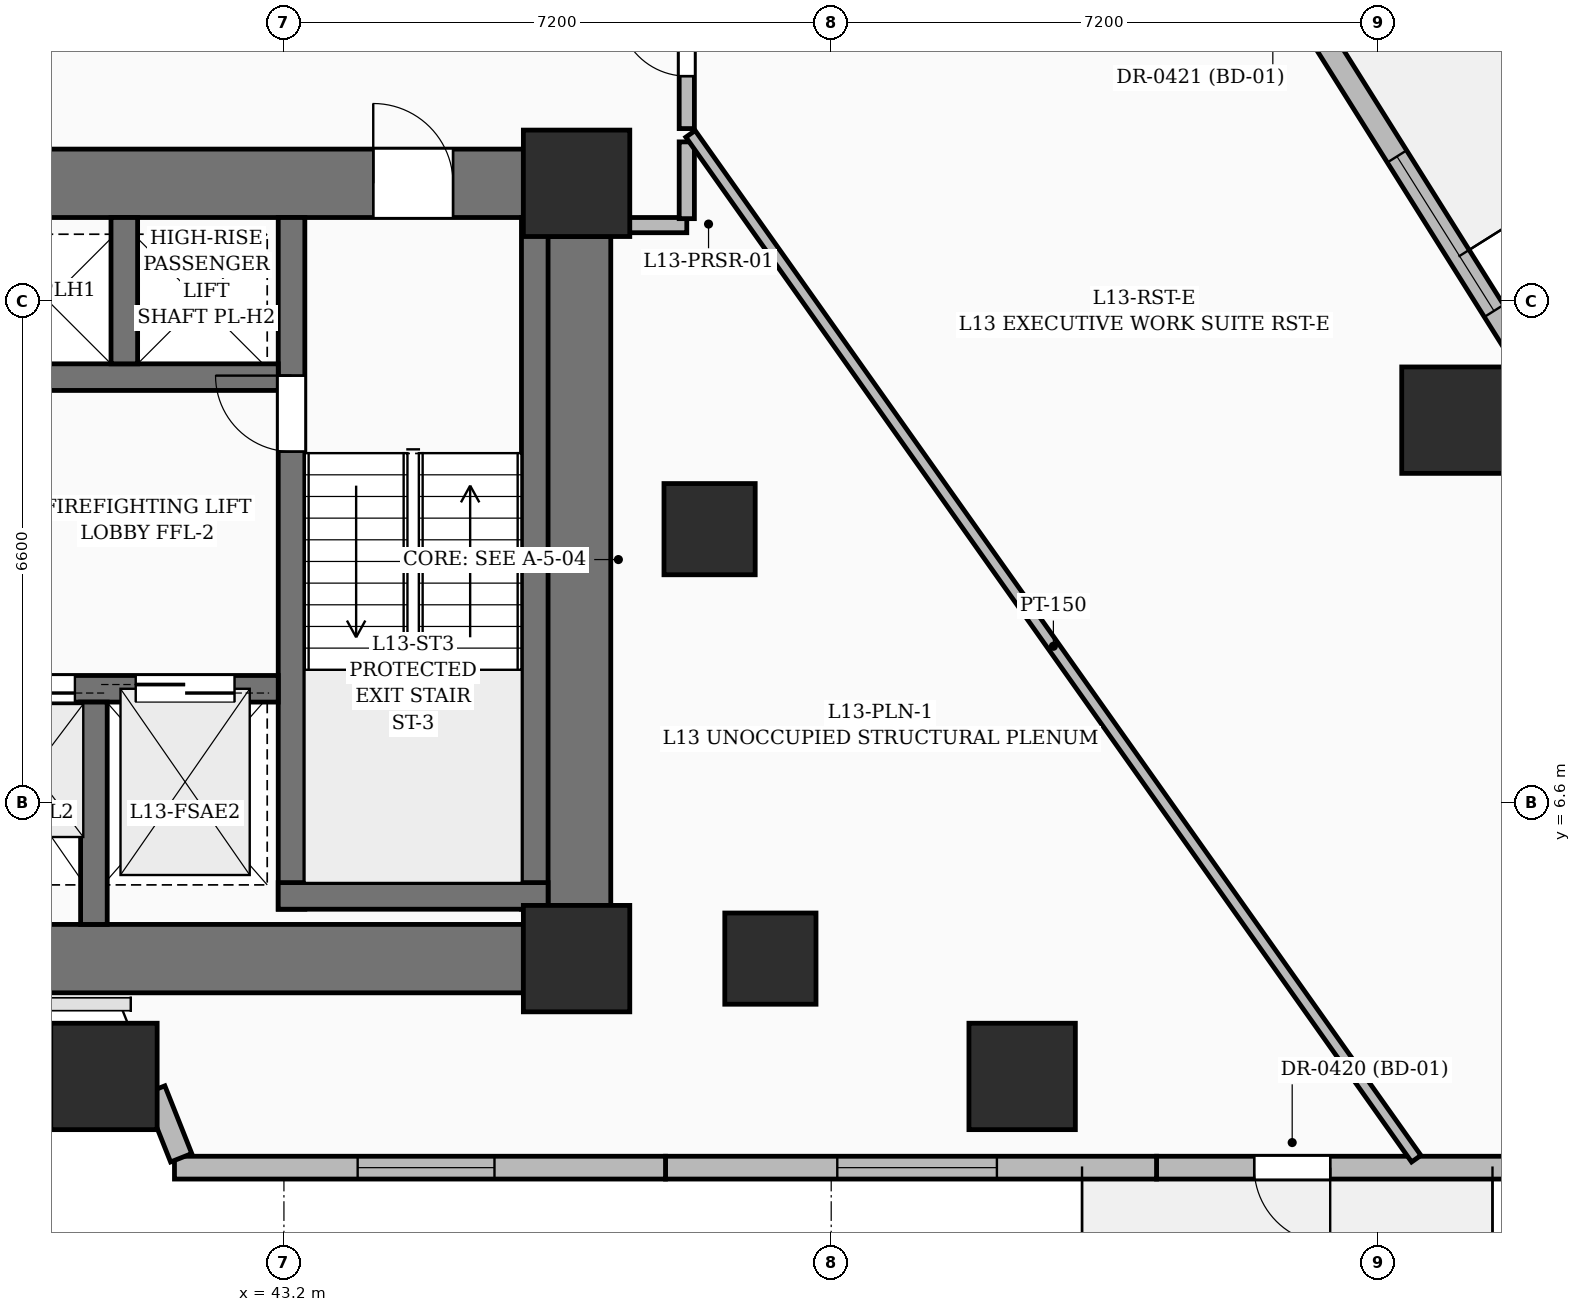
"""IFC4 building model, lengths in metres.
Left out: names, types, materials, properties, quantities, classifications, styles, units other than length and angle.
Written with IfcOpenShell. Run it as: python <this file> out.ifc"""

import sys

from ifc_helpers import new_model, si_unit, direction, frame, frame_2d, origin, origin_2d, place, context, subcontext, project, spatial, rectangle, extrude, element, fill, save


model = new_model("IFC4")
c1 = context("Model", 3, precision=1e-05, world=origin(), true_north=direction((0.0, 1.0)))
c2 = subcontext(c1, "Body", "Model", "MODEL_VIEW")
j1 = project(units=[si_unit("LENGTHUNIT", "METRE"), si_unit("PLANEANGLEUNIT", "RADIAN")], contexts=[c1])
p1 = place(None, origin())
s1 = spatial("IfcSite", under=j1, at=p1, CompositionType="ELEMENT")
p2 = place(p1, origin())
s2 = spatial("IfcBuilding", under=s1, at=p2, CompositionType="ELEMENT")
p3 = place(p2, frame((0.0, 0.0, 57.0)))
s3 = spatial("IfcBuildingStorey", under=s2, at=p3, CompositionType="ELEMENT", Elevation=57.0)
for number, where, z_axis, x_axis in (
    (1, (47.05, 4.55, 0.0), (0.0, 0.0, 1.0), (1.0, 0.0, 0.0)),
    (2, (47.05, 14.75, 0.0), (0.0, 0.0, 1.0), (1.0, 0.0, 0.0)),
):
    element("IfcColumn", number, at=place(p3, frame(where, z_axis=z_axis, x_axis=x_axis)), inside=s3, PredefinedType="COLUMN", context=c2, shape_type="SweptSolid", body=[
        extrude(rectangle(XDim=1.4, YDim=1.4, at=origin_2d()), origin(), (0.0, 0.0, 1.0), 3.6),
    ])
for number, where, z_axis, x_axis in (
    (3, (49.6, 4.55, 0.0), (0.0, 0.0, 1.0), (1.0, 0.0, 0.0)),
    (4, (48.8, 10.2, 0.0), (0.0, 0.0, 1.0), (1.0, 0.0, 0.0)),
):
    element("IfcColumn", number, at=place(p3, frame(where, z_axis=z_axis, x_axis=x_axis)), inside=s3, PredefinedType="COLUMN", context=c2, shape_type="SweptSolid", body=[
        extrude(rectangle(XDim=1.2, YDim=1.2, at=origin_2d()), origin(), (0.0, 0.0, 1.0), 3.6),
    ])
p4 = place(p3, frame((35.85, 4.55, 0.0), z_axis=(0.0, 0.0, 1.0), x_axis=(1.0, 0.0, 0.0)))
e5 = element("IfcWall", 5, at=p4, inside=s3, PredefinedType="SHEAR", context=c2, shape_type="SweptSolid", body=[
    extrude(rectangle(XDim=10.5, YDim=0.9, at=frame_2d((5.25, 0.0))), origin(), (0.0, 0.0, 1.0), 3.6),
])
p5 = place(p3, frame((35.85, 14.75, 0.0), z_axis=(0.0, 0.0, 1.0), x_axis=(1.0, 0.0, 0.0)))
e6 = element("IfcWall", 6, at=p5, inside=s3, PredefinedType="SHEAR", context=c2, shape_type="SweptSolid", body=[
    extrude(rectangle(XDim=10.5, YDim=0.9, at=frame_2d((5.25, 0.0))), origin(), (0.0, 0.0, 1.0), 3.6),
])
p6 = place(p5, frame((0.925, 0.0, 0.0)))
e7 = element("IfcOpeningElement", 7, at=p6, cuts=e6, PredefinedType="OPENING", context=c2, shape_type="SweptSolid", body=[
    extrude(rectangle(XDim=1.05, YDim=2.15, at=frame_2d((0.525, 1.075))), frame((0.0, 0.46, 0.0), z_axis=(0.0, -1.0, 0.0), x_axis=(1.0, 0.0, 0.0)), (0.0, 0.0, 1.0), 0.92),
])
p7 = place(p5, frame((8.525, 0.0, 0.0)))
e8 = element("IfcOpeningElement", 8, at=p7, cuts=e6, PredefinedType="OPENING", context=c2, shape_type="SweptSolid", body=[
    extrude(rectangle(XDim=1.05, YDim=2.15, at=frame_2d((0.525, 1.075))), frame((0.0, 0.46, 0.0), z_axis=(0.0, -1.0, 0.0), x_axis=(1.0, 0.0, 0.0)), (0.0, 0.0, 1.0), 0.92),
])
p8 = place(p3, frame((47.05, 5.25, 0.0), z_axis=(0.0, 0.0, 1.0), x_axis=(0.0, 1.0, 0.0)))
e9 = element("IfcWall", 9, at=p8, inside=s3, PredefinedType="SHEAR", context=c2, shape_type="SweptSolid", body=[
    extrude(rectangle(XDim=8.8, YDim=0.9, at=frame_2d((4.4, 0.0))), origin(), (0.0, 0.0, 1.0), 3.6),
])
p9 = place(p3, frame((43.3, 5.2, 0.0), z_axis=(0.0, 0.0, 1.0), x_axis=(0.0, 1.0, 0.0)))
e10 = element("IfcWall", 10, at=p9, inside=s3, PredefinedType="SOLIDWALL", context=c2, shape_type="SweptSolid", body=[
    extrude(rectangle(XDim=9.1, YDim=0.35, at=frame_2d((4.55, 0.0))), origin(), (0.0, 0.0, 1.0), 3.6),
])
p10 = place(p9, frame((6.02, 0.0, 0.0)))
e11 = element("IfcOpeningElement", 11, at=p10, cuts=e10, PredefinedType="OPENING", context=c2, shape_type="SweptSolid", body=[
    extrude(rectangle(XDim=1.0, YDim=2.15, at=frame_2d((0.5, 1.075))), frame((0.0, 0.185, 0.0), z_axis=(0.0, -1.0, 0.0), x_axis=(1.0, 0.0, 0.0)), (0.0, 0.0, 1.0), 0.37),
])
p11 = place(p3, frame((46.5, 5.2, 0.0), z_axis=(0.0, 0.0, 1.0), x_axis=(0.0, 1.0, 0.0)))
e12 = element("IfcWall", 12, at=p11, inside=s3, PredefinedType="SOLIDWALL", context=c2, shape_type="SweptSolid", body=[
    extrude(rectangle(XDim=9.1, YDim=0.35, at=frame_2d((4.55, 0.0))), origin(), (0.0, 0.0, 1.0), 3.6),
])
p12 = place(p3, frame((43.125, 5.375, 0.0), z_axis=(0.0, 0.0, 1.0), x_axis=(1.0, 0.0, 0.0)))
e13 = element("IfcWall", 13, at=p12, inside=s3, PredefinedType="SOLIDWALL", context=c2, shape_type="SweptSolid", body=[
    extrude(rectangle(XDim=3.55, YDim=0.35, at=frame_2d((1.775, 0.0))), origin(), (0.0, 0.0, 1.0), 3.6),
])
p13 = place(p3, frame((39.075, 8.1, 0.0), z_axis=(0.0, 0.0, 1.0), x_axis=(1.0, 0.0, 0.0)))
e14 = element("IfcWall", 14, at=p13, inside=s3, PredefinedType="SOLIDWALL", context=c2, shape_type="SweptSolid", body=[
    extrude(rectangle(XDim=4.05, YDim=0.35, at=frame_2d((2.025, 0.0))), origin(), (0.0, 0.0, 1.0), 3.6),
])
p14 = place(p13, frame((2.175, 0.0, 0.0)))
e15 = element("IfcOpeningElement", 15, at=p14, cuts=e14, PredefinedType="OPENING", context=c2, shape_type="SweptSolid", body=[
    extrude(rectangle(XDim=1.3, YDim=2.25, at=frame_2d((0.65, 1.125))), frame((0.0, 0.185, 0.0), z_axis=(0.0, -1.0, 0.0), x_axis=(1.0, 0.0, 0.0)), (0.0, 0.0, 1.0), 0.37),
])
p15 = place(p13, frame((0.275, 0.0, 0.0)))
e16 = element("IfcOpeningElement", 16, at=p15, cuts=e14, PredefinedType="OPENING", context=c2, shape_type="SweptSolid", body=[
    extrude(rectangle(XDim=1.1, YDim=2.2, at=frame_2d((0.55, 1.1))), frame((0.0, 0.185, 0.0), z_axis=(0.0, -1.0, 0.0), x_axis=(1.0, 0.0, 0.0)), (0.0, 0.0, 1.0), 0.37),
])
p16 = place(p3, frame((40.7, 5.0, 0.0), z_axis=(0.0, 0.0, 1.0), x_axis=(0.0, 1.0, 0.0)))
e17 = element("IfcWall", 17, at=p16, inside=s3, PredefinedType="SOLIDWALL", context=c2, shape_type="SweptSolid", body=[
    extrude(rectangle(XDim=2.925, YDim=0.35, at=frame_2d((1.462, 0.0))), origin(), (0.0, 0.0, 1.0), 3.6),
])
p17 = place(p3, frame((39.075, 12.2, 0.0), z_axis=(0.0, 0.0, 1.0), x_axis=(1.0, 0.0, 0.0)))
e18 = element("IfcWall", 18, at=p17, inside=s3, PredefinedType="SOLIDWALL", context=c2, shape_type="SweptSolid", body=[
    extrude(rectangle(XDim=4.05, YDim=0.35, at=frame_2d((2.025, 0.0))), origin(), (0.0, 0.0, 1.0), 3.6),
])
p18 = place(p3, frame((41.1, 12.375, 0.0), z_axis=(0.0, 0.0, 1.0), x_axis=(0.0, 1.0, 0.0)))
e19 = element("IfcWall", 19, at=p18, inside=s3, PredefinedType="SOLIDWALL", context=c2, shape_type="SweptSolid", body=[
    extrude(rectangle(XDim=1.925, YDim=0.35, at=frame_2d((0.962, 0.0))), origin(), (0.0, 0.0, 1.0), 3.6),
])
for number, where, z_axis, x_axis in (
    (20, (40.832, 3.0, 0.0), (0.0, 0.0, 1.0), (1.0, 0.0, 0.0)),
    (21, (52.912, 3.0, 0.0), (0.0, 0.0, 1.0), (1.0, 0.0, 0.0)),
    (22, (58.606, 11.634, 0.0), (0.0, 0.0, 1.0), (1.0, 0.0, 0.0)),
):
    element("IfcColumn", number, at=place(p3, frame(where, z_axis=z_axis, x_axis=x_axis)), inside=s3, PredefinedType="COLUMN", context=c2, shape_type="SweptSolid", body=[
        extrude(rectangle(XDim=1.4, YDim=1.4, at=origin_2d()), origin(), (0.0, 0.0, 1.0), 3.6),
    ])
p19 = place(p3, frame((56.873, 16.649, 0.0), z_axis=(0.0, 0.0, 1.0), x_axis=(0.531897384848, -0.846808816671, 0.0)))
e23 = element("IfcWall", 23, at=p19, inside=s3, PredefinedType="SOLIDWALL", context=c2, shape_type="SweptSolid", body=[
    extrude(rectangle(XDim=6.238, YDim=0.3, at=frame_2d((3.119, 0.0))), origin(), (0.0, 0.0, 1.0), 3.35),
])
p20 = place(p19, frame((1.825, 0.0, 0.6)))
e24 = element("IfcOpeningElement", 24, at=p20, cuts=e23, PredefinedType="OPENING", context=c2, shape_type="SweptSolid", body=[
    extrude(rectangle(XDim=2.4, YDim=2.1, at=frame_2d((1.2, 1.05))), frame((0.0, 0.16, 0.0), z_axis=(0.0, -1.0, 0.0), x_axis=(1.0, 0.0, 0.0)), (0.0, 0.0, 1.0), 0.32),
])
p21 = place(p3, frame((60.535, 1.8, 0.0), z_axis=(0.0, 0.0, 1.0), x_axis=(-1.0, 0.0, 0.0)))
e25 = element("IfcWall", 25, at=p21, inside=s3, PredefinedType="SOLIDWALL", context=c2, shape_type="SweptSolid", body=[
    extrude(rectangle(XDim=5.855, YDim=0.3, at=frame_2d((2.927, 0.0))), origin(), (0.0, 0.0, 1.0), 3.35),
])
p22 = place(p21, frame((3.57, 0.0, 0.0)))
e26 = element("IfcOpeningElement", 26, at=p22, cuts=e25, PredefinedType="OPENING", context=c2, shape_type="SweptSolid", body=[
    extrude(rectangle(XDim=1.0, YDim=2.2, at=frame_2d((0.5, 1.1))), frame((0.0, 0.16, 0.0), z_axis=(0.0, -1.0, 0.0), x_axis=(1.0, 0.0, 0.0)), (0.0, 0.0, 1.0), 0.32),
])
p23 = place(p3, frame((54.68, 1.8, 0.0), z_axis=(0.0, 0.0, 1.0), x_axis=(-1.0, 0.0, 0.0)))
e27 = element("IfcWall", 27, at=p23, inside=s3, PredefinedType="SOLIDWALL", context=c2, shape_type="SweptSolid", body=[
    extrude(rectangle(XDim=6.46, YDim=0.3, at=frame_2d((3.23, 0.0))), origin(), (0.0, 0.0, 1.0), 3.35),
])
p24 = place(p23, frame((2.1, 0.0, 0.55)))
e28 = element("IfcOpeningElement", 28, at=p24, cuts=e27, PredefinedType="OPENING", context=c2, shape_type="SweptSolid", body=[
    extrude(rectangle(XDim=2.1, YDim=2.4, at=frame_2d((1.05, 1.2))), frame((0.0, 0.16, 0.0), z_axis=(0.0, -1.0, 0.0), x_axis=(1.0, 0.0, 0.0)), (0.0, 0.0, 1.0), 0.32),
])
p25 = place(p3, frame((48.22, 1.8, 0.0), z_axis=(0.0, 0.0, 1.0), x_axis=(-1.0, 0.0, 0.0)))
e29 = element("IfcWall", 29, at=p25, inside=s3, PredefinedType="SOLIDWALL", context=c2, shape_type="SweptSolid", body=[
    extrude(rectangle(XDim=6.46, YDim=0.3, at=frame_2d((3.23, 0.0))), origin(), (0.0, 0.0, 1.0), 3.35),
])
p26 = place(p25, frame((2.25, 0.0, 0.6)))
e30 = element("IfcOpeningElement", 30, at=p26, cuts=e29, PredefinedType="OPENING", context=c2, shape_type="SweptSolid", body=[
    extrude(rectangle(XDim=1.8, YDim=2.1, at=frame_2d((0.9, 1.05))), frame((0.0, 0.16, 0.0), z_axis=(0.0, -1.0, 0.0), x_axis=(1.0, 0.0, 0.0)), (0.0, 0.0, 1.0), 0.32),
])
p27 = place(p3, frame((41.848, 1.93, 0.0), z_axis=(0.0, 0.0, 1.0), x_axis=(-0.369589416429, 0.92919516963, 0.0)))
e31 = element("IfcWall", 31, at=p27, inside=s3, PredefinedType="SOLIDWALL", context=c2, shape_type="SweptSolid", body=[
    extrude(rectangle(XDim=0.958, YDim=0.3, at=frame_2d((0.479, 0.0))), origin(), (0.0, 0.0, 1.0), 2.375),
])
p28 = place(p3, frame((47.5, 14.2, 0.0), z_axis=(0.0, 0.0, 1.0), x_axis=(1.0, 0.0, 0.0)))
e32 = element("IfcWall", 32, at=p28, inside=s3, PredefinedType="PARTITIONING", context=c2, shape_type="SweptSolid", body=[
    extrude(rectangle(XDim=1.0, YDim=0.2, at=frame_2d((0.5, 0.0))), origin(), (0.0, 0.0, 1.0), 3.35),
])
p29 = place(p3, frame((48.5, 14.285, 0.0), z_axis=(0.0, 0.0, 1.0), x_axis=(0.0, 1.0, 0.0)))
e33 = element("IfcWall", 33, at=p29, inside=s3, PredefinedType="PARTITIONING", context=c2, shape_type="SweptSolid", body=[
    extrude(rectangle(XDim=1.01, YDim=0.2, at=frame_2d((0.505, 0.0))), origin(), (0.0, 0.0, 1.0), 3.35),
])
p30 = place(p3, frame((48.5, 15.47, 0.0), z_axis=(0.0, 0.0, 1.0), x_axis=(0.0, 1.0, 0.0)))
e34 = element("IfcWall", 34, at=p30, inside=s3, PredefinedType="PARTITIONING", context=c2, shape_type="SweptSolid", body=[
    extrude(rectangle(XDim=2.28, YDim=0.2, at=frame_2d((1.14, 0.0))), origin(), (0.0, 0.0, 1.0), 2.279),
])
p31 = place(p30, frame((0.69, 0.0, 0.0)))
e35 = element("IfcOpeningElement", 35, at=p31, cuts=e34, PredefinedType="OPENING", context=c2, shape_type="SweptSolid", body=[
    extrude(rectangle(XDim=0.9, YDim=2.1, at=frame_2d((0.45, 1.05))), frame((0.0, 0.11, 0.0), z_axis=(0.0, -1.0, 0.0), x_axis=(1.0, 0.0, 0.0)), (0.0, 0.0, 1.0), 0.22),
])
p32 = place(p3, frame((58.097, 1.918, 0.0), z_axis=(0.0, 0.0, 1.0), x_axis=(-0.577911961482, 0.816099114554, 0.0)))
e36 = element("IfcWall", 36, at=p32, inside=s3, PredefinedType="PARTITIONING", context=c2, shape_type="SweptSolid", body=[
    extrude(rectangle(XDim=16.521, YDim=0.15, at=frame_2d((8.26, 0.0))), origin(), (0.0, 0.0, 1.0), 2.279),
])
p33 = place(p20, origin())
e37 = element("IfcWindow", 37, at=p33, inside=s3, PartitioningType="SINGLE_PANEL", PredefinedType="WINDOW", context=c2, shape_type="SweptSolid", body=[
    extrude(rectangle(XDim=2.4, YDim=2.1, at=frame_2d((1.2, 1.05))), frame((0.0, 0.03, 0.0), z_axis=(0.0, -1.0, 0.0), x_axis=(1.0, 0.0, 0.0)), (0.0, 0.0, 1.0), 0.06),
])
fill(e24, e37)
p34 = place(p22, origin())
e38 = element("IfcDoor", 38, at=p34, inside=s3, OperationType="SINGLE_SWING_LEFT", PredefinedType="DOOR", context=c2, shape_type="SweptSolid", body=[
    extrude(rectangle(XDim=1.0, YDim=2.2, at=frame_2d((0.5, 1.1))), frame((0.0, 0.025, 0.0), z_axis=(0.0, -1.0, 0.0), x_axis=(1.0, 0.0, 0.0)), (0.0, 0.0, 1.0), 0.05),
])
fill(e26, e38)
p35 = place(p24, origin())
e39 = element("IfcWindow", 39, at=p35, inside=s3, PartitioningType="SINGLE_PANEL", PredefinedType="WINDOW", context=c2, shape_type="SweptSolid", body=[
    extrude(rectangle(XDim=2.1, YDim=2.4, at=frame_2d((1.05, 1.2))), frame((0.0, 0.03, 0.0), z_axis=(0.0, -1.0, 0.0), x_axis=(1.0, 0.0, 0.0)), (0.0, 0.0, 1.0), 0.06),
])
fill(e28, e39)
p36 = place(p26, origin())
e40 = element("IfcWindow", 40, at=p36, inside=s3, PartitioningType="SINGLE_PANEL", PredefinedType="WINDOW", context=c2, shape_type="SweptSolid", body=[
    extrude(rectangle(XDim=1.8, YDim=2.1, at=frame_2d((0.9, 1.05))), frame((0.0, 0.03, 0.0), z_axis=(0.0, -1.0, 0.0), x_axis=(1.0, 0.0, 0.0)), (0.0, 0.0, 1.0), 0.06),
])
fill(e30, e40)
p37 = place(p7, origin())
e41 = element("IfcDoor", 41, at=p37, inside=s3, OperationType="SINGLE_SWING_LEFT", PredefinedType="DOOR", context=c2, shape_type="SweptSolid", body=[
    extrude(rectangle(XDim=1.05, YDim=2.15, at=frame_2d((0.525, 1.075))), frame((0.0, 0.025, 0.0), z_axis=(0.0, -1.0, 0.0), x_axis=(1.0, 0.0, 0.0)), (0.0, 0.0, 1.0), 0.05),
])
fill(e8, e41)
p38 = place(p10, origin())
e42 = element("IfcDoor", 42, at=p38, inside=s3, OperationType="SINGLE_SWING_RIGHT", PredefinedType="DOOR", context=c2, shape_type="SweptSolid", body=[
    extrude(rectangle(XDim=1.0, YDim=2.15, at=frame_2d((0.5, 1.075))), frame((0.0, 0.025, 0.0), z_axis=(0.0, -1.0, 0.0), x_axis=(1.0, 0.0, 0.0)), (0.0, 0.0, 1.0), 0.05),
])
fill(e11, e42)
p39 = place(p14, origin())
e43 = element("IfcDoor", 43, at=p39, inside=s3, OperationType="DOUBLE_DOOR_SLIDING", PredefinedType="DOOR", context=c2, shape_type="SweptSolid", body=[
    extrude(rectangle(XDim=1.3, YDim=2.25, at=frame_2d((0.65, 1.125))), frame((0.0, 0.025, 0.0), z_axis=(0.0, -1.0, 0.0), x_axis=(1.0, 0.0, 0.0)), (0.0, 0.0, 1.0), 0.05),
])
fill(e15, e43)
p40 = place(p15, origin())
e44 = element("IfcDoor", 44, at=p40, inside=s3, OperationType="DOUBLE_DOOR_SLIDING", PredefinedType="DOOR", context=c2, shape_type="SweptSolid", body=[
    extrude(rectangle(XDim=1.1, YDim=2.2, at=frame_2d((0.55, 1.1))), frame((0.0, 0.025, 0.0), z_axis=(0.0, -1.0, 0.0), x_axis=(1.0, 0.0, 0.0)), (0.0, 0.0, 1.0), 0.05),
])
fill(e16, e44)
p41 = place(p31, origin())
e45 = element("IfcDoor", 45, at=p41, inside=s3, OperationType="SINGLE_SWING_RIGHT", PredefinedType="DOOR", context=c2, shape_type="SweptSolid", body=[
    extrude(rectangle(XDim=0.9, YDim=2.1, at=frame_2d((0.45, 1.05))), frame((0.0, 0.025, 0.0), z_axis=(0.0, -1.0, 0.0), x_axis=(1.0, 0.0, 0.0)), (0.0, 0.0, 1.0), 0.05),
])
fill(e35, e45)
save(model, sys.argv[1])
